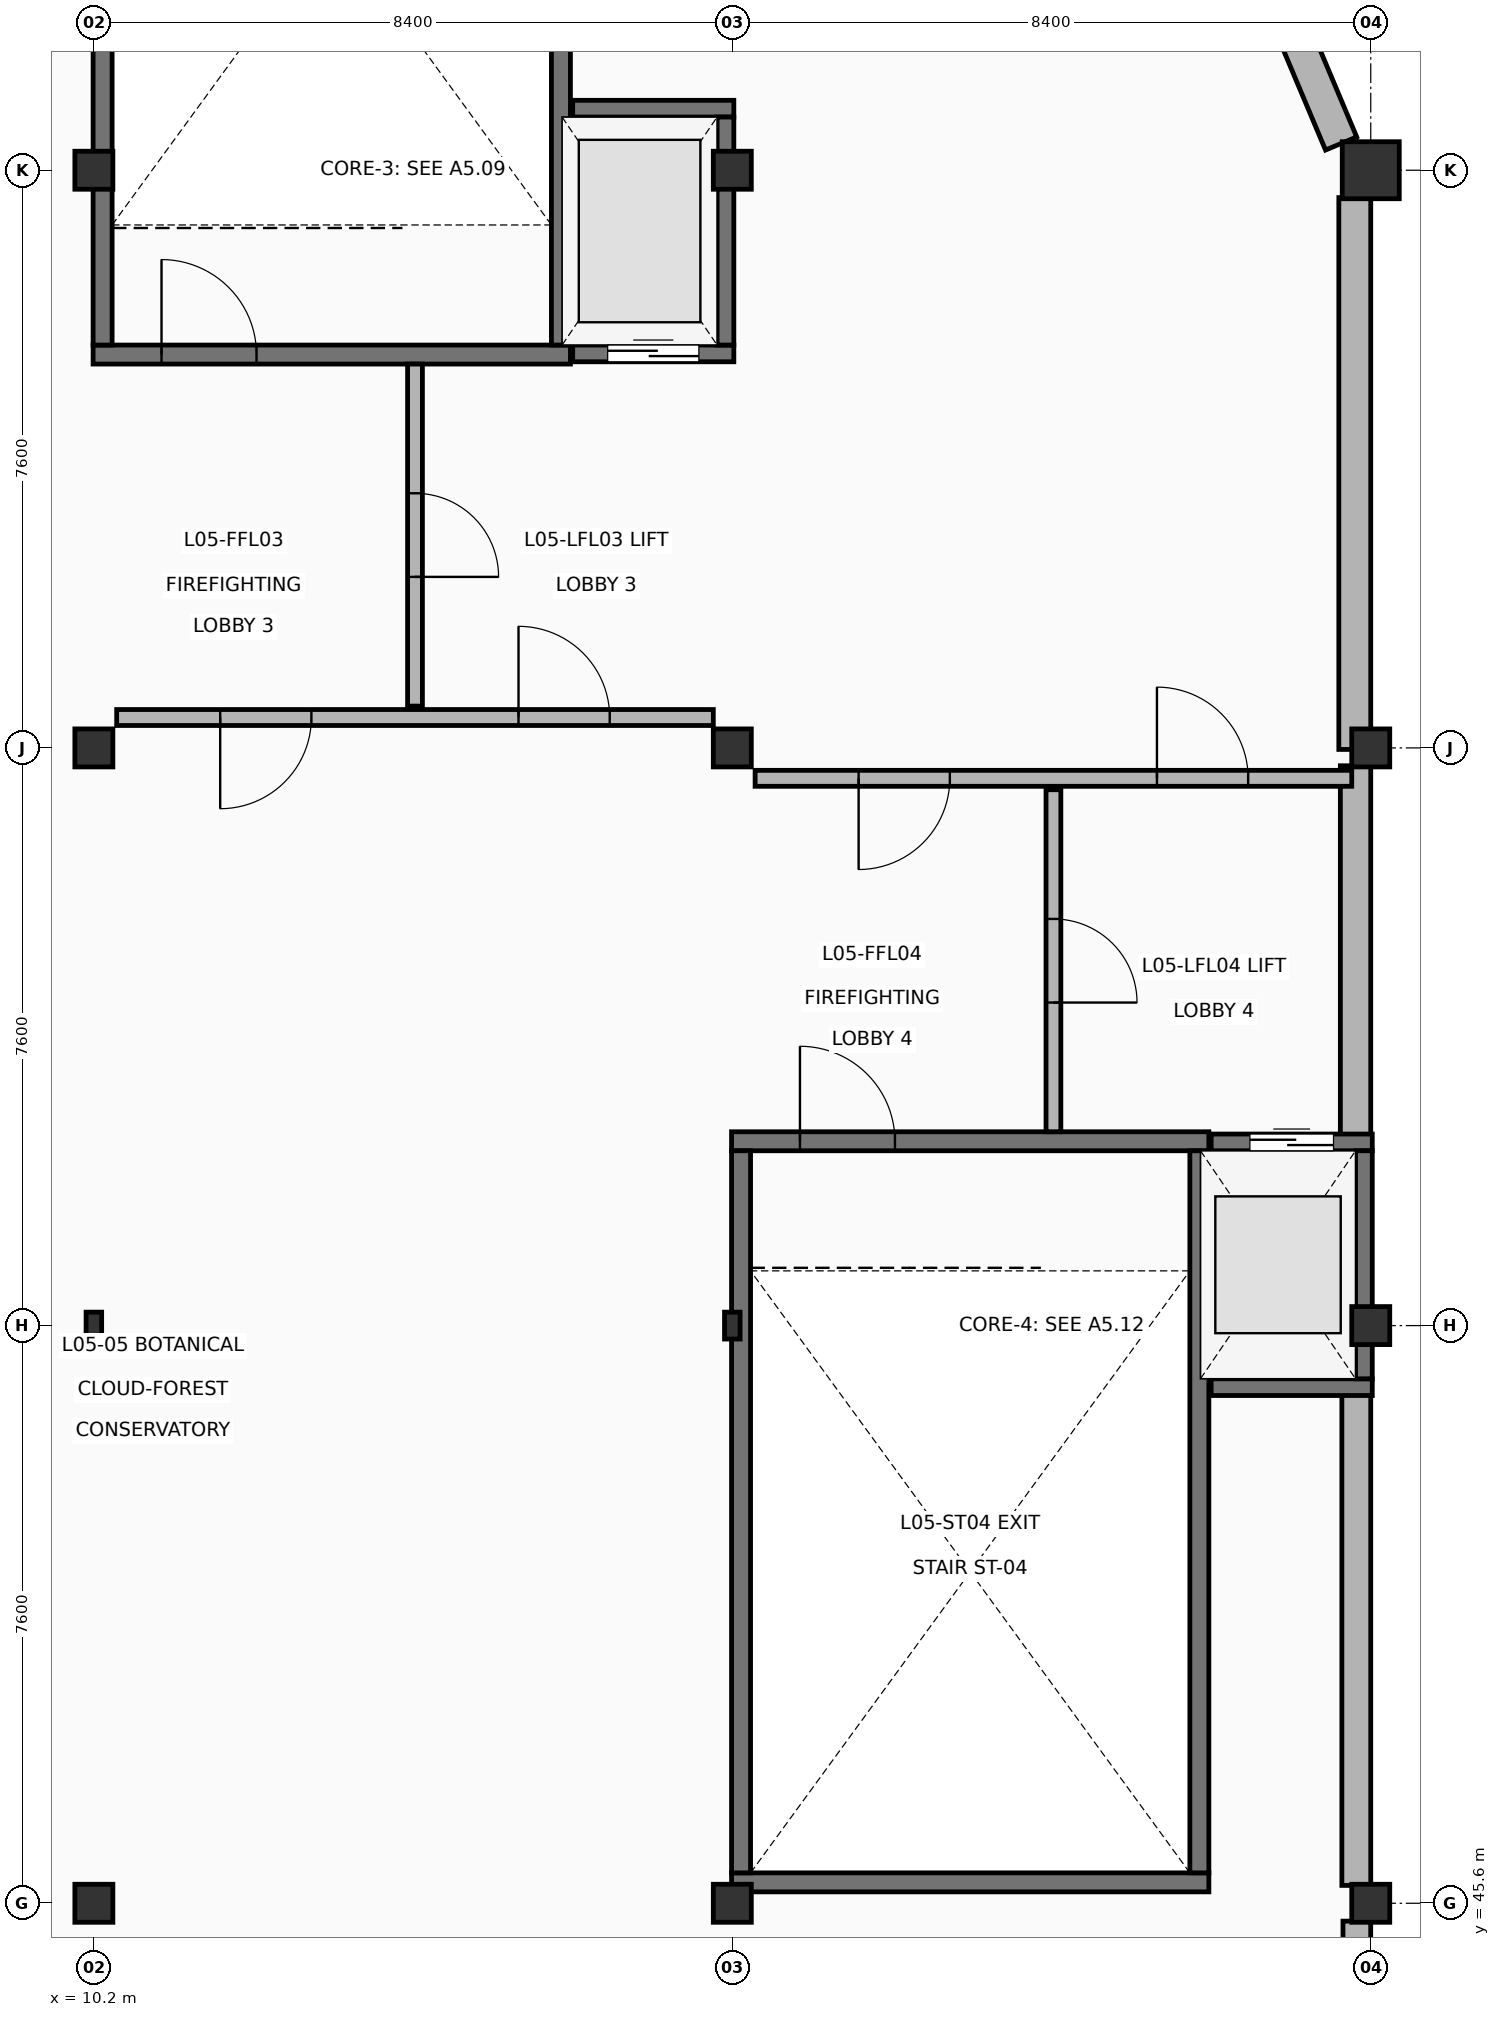
"""IFC4 building model, lengths in metres.
Left out: names, types, materials, properties, quantities, classifications, styles, units other than length and angle.
Written with IfcOpenShell. Run it as: python <this file> out.ifc"""

import sys

from ifc_helpers import new_model, si_unit, direction, frame, frame_2d, origin, origin_2d, place, context, subcontext, project, spatial, rectangle, circle, i_section, extrude, element, fill, save


model = new_model("IFC4")
c1 = context("Model", 3, precision=1e-05, world=origin(), true_north=direction((0.0, 1.0)))
c2 = subcontext(c1, "Body", "Model", "MODEL_VIEW")
j1 = project(units=[si_unit("LENGTHUNIT", "METRE"), si_unit("PLANEANGLEUNIT", "RADIAN")], contexts=[c1])
p1 = place(None, origin())
s1 = spatial("IfcSite", under=j1, at=p1, CompositionType="ELEMENT")
p2 = place(p1, origin())
s2 = spatial("IfcBuilding", under=s1, at=p2, CompositionType="ELEMENT")
p3 = place(p2, frame((0.0, 0.0, 19.8)))
s3 = spatial("IfcBuildingStorey", under=s2, at=p3, CompositionType="ELEMENT", Elevation=19.8)
p4 = place(p3, frame((10.2, 45.6, 0.0), z_axis=(0.0, 0.0, 1.0), x_axis=(1.0, 0.0, 0.0)))
e1 = element("IfcColumn", 1, at=p4, inside=s3, PredefinedType="COLUMN", context=c2, shape_type="SweptSolid", body=[
    extrude(rectangle(XDim=0.5, YDim=0.5, at=origin_2d()), origin(), (0.0, 0.0, 1.0), 4.2),
])
p5 = place(p3, frame((10.2, 53.2, 0.0), z_axis=(0.0, 0.0, 1.0), x_axis=(1.0, 0.0, 0.0)))
e2 = element("IfcColumn", 2, at=p5, inside=s3, PredefinedType="COLUMN", context=c2, shape_type="SweptSolid", body=[
    extrude(i_section(OverallWidth=0.205, OverallDepth=0.354, WebThickness=0.01, FlangeThickness=0.017, at=origin_2d()), origin(), (0.0, 0.0, 1.0), 4.2),
])
for number, where, z_axis, x_axis in (
    (3, (10.2, 60.8, 0.0), (0.0, 0.0, 1.0), (1.0, 0.0, 0.0)),
    (4, (10.2, 68.4, 0.0), (0.0, 0.0, 1.0), (1.0, 0.0, 0.0)),
    (5, (18.6, 45.6, 0.0), (0.0, 0.0, 1.0), (1.0, 0.0, 0.0)),
):
    element("IfcColumn", number, at=place(p3, frame(where, z_axis=z_axis, x_axis=x_axis)), inside=s3, PredefinedType="COLUMN", context=c2, shape_type="SweptSolid", body=[
        extrude(rectangle(XDim=0.5, YDim=0.5, at=origin_2d()), origin(), (0.0, 0.0, 1.0), 4.2),
    ])
p6 = place(p3, frame((18.6, 53.2, 0.0), z_axis=(0.0, 0.0, 1.0), x_axis=(1.0, 0.0, 0.0)))
e6 = element("IfcColumn", 6, at=p6, inside=s3, PredefinedType="COLUMN", context=c2, shape_type="SweptSolid", body=[
    extrude(i_section(OverallWidth=0.205, OverallDepth=0.354, WebThickness=0.01, FlangeThickness=0.017, at=origin_2d()), origin(), (0.0, 0.0, 1.0), 4.2),
])
for number, where, z_axis, x_axis in (
    (7, (18.6, 60.8, 0.0), (0.0, 0.0, 1.0), (1.0, 0.0, 0.0)),
    (8, (18.6, 68.4, 0.0), (0.0, 0.0, 1.0), (1.0, 0.0, 0.0)),
    (9, (27.0, 45.6, 0.0), (0.0, 0.0, 1.0), (1.0, 0.0, 0.0)),
    (10, (27.0, 53.2, 0.0), (0.0, 0.0, 1.0), (1.0, 0.0, 0.0)),
    (11, (27.0, 60.8, 0.0), (0.0, 0.0, 1.0), (1.0, 0.0, 0.0)),
):
    element("IfcColumn", number, at=place(p3, frame(where, z_axis=z_axis, x_axis=x_axis)), inside=s3, PredefinedType="COLUMN", context=c2, shape_type="SweptSolid", body=[
        extrude(rectangle(XDim=0.5, YDim=0.5, at=origin_2d()), origin(), (0.0, 0.0, 1.0), 4.2),
    ])
p7 = place(p3, frame((27.0, 68.4, 0.0), z_axis=(0.0, 0.0, 1.0), x_axis=(1.0, 0.0, 0.0)))
e12 = element("IfcColumn", 12, at=p7, inside=s3, PredefinedType="COLUMN", context=c2, shape_type="SweptSolid", body=[
    extrude(circle(Radius=0.375, at=origin_2d()), origin(), (0.0, 0.0, 1.0), 4.2),
])
p8 = place(p3, frame((23.67, 75.735, 0.0), z_axis=(0.0, 0.0, 1.0), x_axis=(0.388046916513, -0.921639620776, 0.0)))
e13 = element("IfcWall", 13, at=p8, inside=s3, PredefinedType="SOLIDWALL", context=c2, shape_type="SweptSolid", body=[
    extrude(rectangle(XDim=7.577, YDim=0.445, at=frame_2d((3.789, 0.0))), origin(), (0.0, 0.0, 1.0), 3.96),
])
p9 = place(p8, frame((2.788, 0.0, 0.95)))
e14 = element("IfcOpeningElement", 14, at=p9, cuts=e13, PredefinedType="OPENING", context=c2, shape_type="SweptSolid", body=[
    extrude(rectangle(XDim=2.0, YDim=1.85, at=frame_2d((1.0, 0.925))), frame((0.0, 0.232, 0.0), z_axis=(0.0, -1.0, 0.0), x_axis=(1.0, 0.0, 0.0)), (0.0, 0.0, 1.0), 0.465),
])
p10 = place(p3, frame((26.79, 68.04, 0.0), z_axis=(0.0, 0.0, 1.0), x_axis=(0.0, -1.0, 0.0)))
e15 = element("IfcWall", 15, at=p10, inside=s3, PredefinedType="SOLIDWALL", context=c2, shape_type="SweptSolid", body=[
    extrude(rectangle(XDim=7.26, YDim=0.42, at=frame_2d((3.63, 0.0))), origin(), (0.0, 0.0, 1.0), 3.96),
])
p11 = place(p3, frame((26.8, 60.565, 0.0), z_axis=(0.0, 0.0, 1.0), x_axis=(0.0, -1.0, 0.0)))
e16 = element("IfcWall", 16, at=p11, inside=s3, PredefinedType="SOLIDWALL", context=c2, shape_type="SweptSolid", body=[
    extrude(rectangle(XDim=4.885, YDim=0.4, at=frame_2d((2.442, 0.0))), origin(), (0.0, 0.0, 1.0), 3.96),
])
p12 = place(p3, frame((26.81, 52.32, 0.0), z_axis=(0.0, 0.0, 1.0), x_axis=(0.0, -1.0, 0.0)))
e17 = element("IfcWall", 17, at=p12, inside=s3, PredefinedType="SOLIDWALL", context=c2, shape_type="SweptSolid", body=[
    extrude(rectangle(XDim=6.485, YDim=0.38, at=frame_2d((3.243, 0.0))), origin(), (0.0, 0.0, 1.0), 3.96),
])
p13 = place(p3, frame((26.817, 45.365, 0.0), z_axis=(0.0, 0.0, 1.0), x_axis=(0.0, -1.0, 0.0)))
e18 = element("IfcWall", 18, at=p13, inside=s3, PredefinedType="SOLIDWALL", context=c2, shape_type="SweptSolid", body=[
    extrude(rectangle(XDim=7.13, YDim=0.365, at=frame_2d((3.565, 0.0))), origin(), (0.0, 0.0, 1.0), 3.96),
])
p14 = place(p3, frame((10.19, 65.975, 0.0), z_axis=(0.0, 0.0, 1.0), x_axis=(1.0, 0.0, 0.0)))
e19 = element("IfcWall", 19, at=p14, inside=s3, PredefinedType="SHEAR", context=c2, shape_type="SweptSolid", body=[
    extrude(rectangle(XDim=6.28, YDim=0.25, at=frame_2d((3.14, 0.0))), origin(), (0.0, 0.0, 1.0), 3.96),
])
p15 = place(p14, frame((0.9, 0.0, 0.0)))
e20 = element("IfcOpeningElement", 20, at=p15, cuts=e19, PredefinedType="OPENING", context=c2, shape_type="SweptSolid", body=[
    extrude(rectangle(XDim=1.25, YDim=2.2, at=frame_2d((0.625, 1.1))), frame((0.0, 0.135, 0.0), z_axis=(0.0, -1.0, 0.0), x_axis=(1.0, 0.0, 0.0)), (0.0, 0.0, 1.0), 0.27),
])
for number, where, z_axis, x_axis in (
    (21, (10.315, 66.1, 0.0), (0.0, 0.0, 1.0), (0.0, 1.0, 0.0)),
    (22, (16.345, 66.1, 0.0), (0.0, 0.0, 1.0), (0.0, 1.0, 0.0)),
):
    element("IfcWall", number, at=place(p3, frame(where, z_axis=z_axis, x_axis=x_axis)), inside=s3, PredefinedType="SHEAR", context=c2, shape_type="SweptSolid", body=[
        extrude(rectangle(XDim=9.5, YDim=0.25, at=frame_2d((4.75, 0.0))), origin(), (0.0, 0.0, 1.0), 3.96),
    ])
p16 = place(p3, frame((16.5, 65.99, 0.0), z_axis=(0.0, 0.0, 1.0), x_axis=(1.0, 0.0, 0.0)))
e23 = element("IfcWall", 23, at=p16, inside=s3, PredefinedType="SHEAR", context=c2, shape_type="SweptSolid", body=[
    extrude(rectangle(XDim=2.12, YDim=0.22, at=frame_2d((1.06, 0.0))), origin(), (0.0, 0.0, 1.0), 3.96),
])
p17 = place(p16, frame((0.46, 0.0, 0.0)))
e24 = element("IfcOpeningElement", 24, at=p17, cuts=e23, PredefinedType="OPENING", context=c2, shape_type="SweptSolid", body=[
    extrude(rectangle(XDim=1.2, YDim=2.2, at=frame_2d((0.6, 1.1))), frame((0.0, 0.12, 0.0), z_axis=(0.0, -1.0, 0.0), x_axis=(1.0, 0.0, 0.0)), (0.0, 0.0, 1.0), 0.24),
])
p18 = place(p3, frame((16.5, 69.21, 0.0), z_axis=(0.0, 0.0, 1.0), x_axis=(1.0, 0.0, 0.0)))
e25 = element("IfcWall", 25, at=p18, inside=s3, PredefinedType="SHEAR", context=c2, shape_type="SweptSolid", body=[
    extrude(rectangle(XDim=2.12, YDim=0.22, at=frame_2d((1.06, 0.0))), origin(), (0.0, 0.0, 1.0), 3.96),
])
p19 = place(p3, frame((18.51, 66.1, 0.0), z_axis=(0.0, 0.0, 1.0), x_axis=(0.0, 1.0, 0.0)))
e26 = element("IfcWall", 26, at=p19, inside=s3, PredefinedType="SHEAR", context=c2, shape_type="SweptSolid", body=[
    extrude(rectangle(XDim=3.0, YDim=0.22, at=frame_2d((1.5, 0.0))), origin(), (0.0, 0.0, 1.0), 3.96),
])
p20 = place(p3, frame((10.5, 61.2, 0.0), z_axis=(0.0, 0.0, 1.0), x_axis=(1.0, 0.0, 0.0)))
e27 = element("IfcWall", 27, at=p20, inside=s3, PredefinedType="PARTITIONING", context=c2, shape_type="SweptSolid", body=[
    extrude(rectangle(XDim=7.85, YDim=0.21, at=frame_2d((3.925, 0.0))), origin(), (0.0, 0.0, 1.0), 3.305),
])
p21 = place(p20, frame((1.362, 0.0, 0.0)))
e28 = element("IfcOpeningElement", 28, at=p21, cuts=e27, PredefinedType="OPENING", context=c2, shape_type="SweptSolid", body=[
    extrude(rectangle(XDim=1.2, YDim=2.2, at=frame_2d((0.6, 1.1))), frame((0.0, 0.115, 0.0), z_axis=(0.0, -1.0, 0.0), x_axis=(1.0, 0.0, 0.0)), (0.0, 0.0, 1.0), 0.23),
])
p22 = place(p20, frame((5.287, 0.0, 0.0)))
e29 = element("IfcOpeningElement", 29, at=p22, cuts=e27, PredefinedType="OPENING", context=c2, shape_type="SweptSolid", body=[
    extrude(rectangle(XDim=1.2, YDim=2.2, at=frame_2d((0.6, 1.1))), frame((0.0, 0.115, 0.0), z_axis=(0.0, -1.0, 0.0), x_axis=(1.0, 0.0, 0.0)), (0.0, 0.0, 1.0), 0.23),
])
p23 = place(p3, frame((14.425, 61.35, 0.0), z_axis=(0.0, 0.0, 1.0), x_axis=(0.0, 1.0, 0.0)))
e30 = element("IfcWall", 30, at=p23, inside=s3, PredefinedType="PARTITIONING", context=c2, shape_type="SweptSolid", body=[
    extrude(rectangle(XDim=4.5, YDim=0.195, at=frame_2d((2.25, 0.0))), origin(), (0.0, 0.0, 1.0), 3.335),
])
p24 = place(p23, frame((1.7, 0.0, 0.0)))
e31 = element("IfcOpeningElement", 31, at=p24, cuts=e30, PredefinedType="OPENING", context=c2, shape_type="SweptSolid", body=[
    extrude(rectangle(XDim=1.1, YDim=2.15, at=frame_2d((0.55, 1.075))), frame((0.0, 0.107, 0.0), z_axis=(0.0, -1.0, 0.0), x_axis=(1.0, 0.0, 0.0)), (0.0, 0.0, 1.0), 0.215),
])
p25 = place(p3, frame((18.59, 45.875, 0.0), z_axis=(0.0, 0.0, 1.0), x_axis=(1.0, 0.0, 0.0)))
e32 = element("IfcWall", 32, at=p25, inside=s3, PredefinedType="SHEAR", context=c2, shape_type="SweptSolid", body=[
    extrude(rectangle(XDim=6.28, YDim=0.25, at=frame_2d((3.14, 0.0))), origin(), (0.0, 0.0, 1.0), 3.96),
])
p26 = place(p3, frame((18.59, 55.625, 0.0), z_axis=(0.0, 0.0, 1.0), x_axis=(1.0, 0.0, 0.0)))
e33 = element("IfcWall", 33, at=p26, inside=s3, PredefinedType="SHEAR", context=c2, shape_type="SweptSolid", body=[
    extrude(rectangle(XDim=6.28, YDim=0.25, at=frame_2d((3.14, 0.0))), origin(), (0.0, 0.0, 1.0), 3.96),
])
p27 = place(p26, frame((0.9, 0.0, 0.0)))
e34 = element("IfcOpeningElement", 34, at=p27, cuts=e33, PredefinedType="OPENING", context=c2, shape_type="SweptSolid", body=[
    extrude(rectangle(XDim=1.25, YDim=2.2, at=frame_2d((0.625, 1.1))), frame((0.0, 0.135, 0.0), z_axis=(0.0, -1.0, 0.0), x_axis=(1.0, 0.0, 0.0)), (0.0, 0.0, 1.0), 0.27),
])
for number, where, z_axis, x_axis in (
    (35, (18.715, 46.0, 0.0), (0.0, 0.0, 1.0), (0.0, 1.0, 0.0)),
    (36, (24.745, 46.0, 0.0), (0.0, 0.0, 1.0), (0.0, 1.0, 0.0)),
):
    element("IfcWall", number, at=place(p3, frame(where, z_axis=z_axis, x_axis=x_axis)), inside=s3, PredefinedType="SHEAR", context=c2, shape_type="SweptSolid", body=[
        extrude(rectangle(XDim=9.5, YDim=0.25, at=frame_2d((4.75, 0.0))), origin(), (0.0, 0.0, 1.0), 3.96),
    ])
p28 = place(p3, frame((24.9, 52.39, 0.0), z_axis=(0.0, 0.0, 1.0), x_axis=(1.0, 0.0, 0.0)))
e37 = element("IfcWall", 37, at=p28, inside=s3, PredefinedType="SHEAR", context=c2, shape_type="SweptSolid", body=[
    extrude(rectangle(XDim=2.12, YDim=0.22, at=frame_2d((1.06, 0.0))), origin(), (0.0, 0.0, 1.0), 3.96),
])
p29 = place(p3, frame((24.9, 55.61, 0.0), z_axis=(0.0, 0.0, 1.0), x_axis=(1.0, 0.0, 0.0)))
e38 = element("IfcWall", 38, at=p29, inside=s3, PredefinedType="SHEAR", context=c2, shape_type="SweptSolid", body=[
    extrude(rectangle(XDim=2.12, YDim=0.22, at=frame_2d((1.06, 0.0))), origin(), (0.0, 0.0, 1.0), 3.96),
])
p30 = place(p29, frame((0.51, 0.0, 0.0)))
e39 = element("IfcOpeningElement", 39, at=p30, cuts=e38, PredefinedType="OPENING", context=c2, shape_type="SweptSolid", body=[
    extrude(rectangle(XDim=1.1, YDim=2.15, at=frame_2d((0.55, 1.075))), frame((0.0, 0.12, 0.0), z_axis=(0.0, -1.0, 0.0), x_axis=(1.0, 0.0, 0.0)), (0.0, 0.0, 1.0), 0.24),
])
p31 = place(p3, frame((26.91, 52.5, 0.0), z_axis=(0.0, 0.0, 1.0), x_axis=(0.0, 1.0, 0.0)))
e40 = element("IfcWall", 40, at=p31, inside=s3, PredefinedType="SHEAR", context=c2, shape_type="SweptSolid", body=[
    extrude(rectangle(XDim=3.0, YDim=0.22, at=frame_2d((1.5, 0.0))), origin(), (0.0, 0.0, 1.0), 3.96),
])
p32 = place(p3, frame((18.9, 60.4, 0.0), z_axis=(0.0, 0.0, 1.0), x_axis=(1.0, 0.0, 0.0)))
e41 = element("IfcWall", 41, at=p32, inside=s3, PredefinedType="PARTITIONING", context=c2, shape_type="SweptSolid", body=[
    extrude(rectangle(XDim=7.85, YDim=0.21, at=frame_2d((3.925, 0.0))), origin(), (0.0, 0.0, 1.0), 3.335),
])
p33 = place(p32, frame((1.362, 0.0, 0.0)))
e42 = element("IfcOpeningElement", 42, at=p33, cuts=e41, PredefinedType="OPENING", context=c2, shape_type="SweptSolid", body=[
    extrude(rectangle(XDim=1.2, YDim=2.2, at=frame_2d((0.6, 1.1))), frame((0.0, 0.115, 0.0), z_axis=(0.0, -1.0, 0.0), x_axis=(1.0, 0.0, 0.0)), (0.0, 0.0, 1.0), 0.23),
])
p34 = place(p32, frame((5.287, 0.0, 0.0)))
e43 = element("IfcOpeningElement", 43, at=p34, cuts=e41, PredefinedType="OPENING", context=c2, shape_type="SweptSolid", body=[
    extrude(rectangle(XDim=1.2, YDim=2.2, at=frame_2d((0.6, 1.1))), frame((0.0, 0.115, 0.0), z_axis=(0.0, -1.0, 0.0), x_axis=(1.0, 0.0, 0.0)), (0.0, 0.0, 1.0), 0.23),
])
p35 = place(p3, frame((22.825, 55.75, 0.0), z_axis=(0.0, 0.0, 1.0), x_axis=(0.0, 1.0, 0.0)))
e44 = element("IfcWall", 44, at=p35, inside=s3, PredefinedType="PARTITIONING", context=c2, shape_type="SweptSolid", body=[
    extrude(rectangle(XDim=4.5, YDim=0.195, at=frame_2d((2.25, 0.0))), origin(), (0.0, 0.0, 1.0), 3.335),
])
p36 = place(p35, frame((1.7, 0.0, 0.0)))
e45 = element("IfcOpeningElement", 45, at=p36, cuts=e44, PredefinedType="OPENING", context=c2, shape_type="SweptSolid", body=[
    extrude(rectangle(XDim=1.1, YDim=2.15, at=frame_2d((0.55, 1.075))), frame((0.0, 0.107, 0.0), z_axis=(0.0, -1.0, 0.0), x_axis=(1.0, 0.0, 0.0)), (0.0, 0.0, 1.0), 0.215),
])
p37 = place(p15, origin())
e46 = element("IfcDoor", 46, at=p37, inside=s3, OperationType="SINGLE_SWING_LEFT", PredefinedType="DOOR", context=c2, shape_type="SweptSolid", body=[
    extrude(rectangle(XDim=1.25, YDim=2.2, at=frame_2d((0.625, 1.1))), frame((0.0, 0.025, 0.0), z_axis=(0.0, -1.0, 0.0), x_axis=(1.0, 0.0, 0.0)), (0.0, 0.0, 1.0), 0.05),
])
fill(e20, e46)
p38 = place(p17, origin())
e47 = element("IfcDoor", 47, at=p38, inside=s3, OperationType="DOUBLE_DOOR_SLIDING", PredefinedType="DOOR", context=c2, shape_type="SweptSolid", body=[
    extrude(rectangle(XDim=1.2, YDim=2.2, at=frame_2d((0.6, 1.1))), frame((0.0, 0.025, 0.0), z_axis=(0.0, -1.0, 0.0), x_axis=(1.0, 0.0, 0.0)), (0.0, 0.0, 1.0), 0.05),
])
fill(e24, e47)
p39 = place(p21, origin())
e48 = element("IfcDoor", 48, at=p39, inside=s3, OperationType="SINGLE_SWING_RIGHT", PredefinedType="DOOR", context=c2, shape_type="SweptSolid", body=[
    extrude(rectangle(XDim=1.2, YDim=2.2, at=frame_2d((0.6, 1.1))), frame((0.0, 0.025, 0.0), z_axis=(0.0, -1.0, 0.0), x_axis=(1.0, 0.0, 0.0)), (0.0, 0.0, 1.0), 0.05),
])
fill(e28, e48)
p40 = place(p22, origin())
e49 = element("IfcDoor", 49, at=p40, inside=s3, OperationType="SINGLE_SWING_LEFT", PredefinedType="DOOR", context=c2, shape_type="SweptSolid", body=[
    extrude(rectangle(XDim=1.2, YDim=2.2, at=frame_2d((0.6, 1.1))), frame((0.0, 0.025, 0.0), z_axis=(0.0, -1.0, 0.0), x_axis=(1.0, 0.0, 0.0)), (0.0, 0.0, 1.0), 0.05),
])
fill(e29, e49)
p41 = place(p24, origin())
e50 = element("IfcDoor", 50, at=p41, inside=s3, OperationType="SINGLE_SWING_RIGHT", PredefinedType="DOOR", context=c2, shape_type="SweptSolid", body=[
    extrude(rectangle(XDim=1.1, YDim=2.15, at=frame_2d((0.55, 1.075))), frame((0.0, 0.025, 0.0), z_axis=(0.0, -1.0, 0.0), x_axis=(1.0, 0.0, 0.0)), (0.0, 0.0, 1.0), 0.05),
])
fill(e31, e50)
p42 = place(p27, origin())
e51 = element("IfcDoor", 51, at=p42, inside=s3, OperationType="SINGLE_SWING_LEFT", PredefinedType="DOOR", context=c2, shape_type="SweptSolid", body=[
    extrude(rectangle(XDim=1.25, YDim=2.2, at=frame_2d((0.625, 1.1))), frame((0.0, 0.025, 0.0), z_axis=(0.0, -1.0, 0.0), x_axis=(1.0, 0.0, 0.0)), (0.0, 0.0, 1.0), 0.05),
])
fill(e34, e51)
p43 = place(p30, origin())
e52 = element("IfcDoor", 52, at=p43, inside=s3, OperationType="DOUBLE_DOOR_SLIDING", PredefinedType="DOOR", context=c2, shape_type="SweptSolid", body=[
    extrude(rectangle(XDim=1.1, YDim=2.15, at=frame_2d((0.55, 1.075))), frame((0.0, 0.025, 0.0), z_axis=(0.0, -1.0, 0.0), x_axis=(1.0, 0.0, 0.0)), (0.0, 0.0, 1.0), 0.05),
])
fill(e39, e52)
p44 = place(p33, origin())
e53 = element("IfcDoor", 53, at=p44, inside=s3, OperationType="SINGLE_SWING_RIGHT", PredefinedType="DOOR", context=c2, shape_type="SweptSolid", body=[
    extrude(rectangle(XDim=1.2, YDim=2.2, at=frame_2d((0.6, 1.1))), frame((0.0, 0.025, 0.0), z_axis=(0.0, -1.0, 0.0), x_axis=(1.0, 0.0, 0.0)), (0.0, 0.0, 1.0), 0.05),
])
fill(e42, e53)
p45 = place(p34, origin())
e54 = element("IfcDoor", 54, at=p45, inside=s3, OperationType="SINGLE_SWING_LEFT", PredefinedType="DOOR", context=c2, shape_type="SweptSolid", body=[
    extrude(rectangle(XDim=1.2, YDim=2.2, at=frame_2d((0.6, 1.1))), frame((0.0, 0.025, 0.0), z_axis=(0.0, -1.0, 0.0), x_axis=(1.0, 0.0, 0.0)), (0.0, 0.0, 1.0), 0.05),
])
fill(e43, e54)
p46 = place(p36, origin())
e55 = element("IfcDoor", 55, at=p46, inside=s3, OperationType="SINGLE_SWING_RIGHT", PredefinedType="DOOR", context=c2, shape_type="SweptSolid", body=[
    extrude(rectangle(XDim=1.1, YDim=2.15, at=frame_2d((0.55, 1.075))), frame((0.0, 0.025, 0.0), z_axis=(0.0, -1.0, 0.0), x_axis=(1.0, 0.0, 0.0)), (0.0, 0.0, 1.0), 0.05),
])
fill(e45, e55)
save(model, sys.argv[1])
